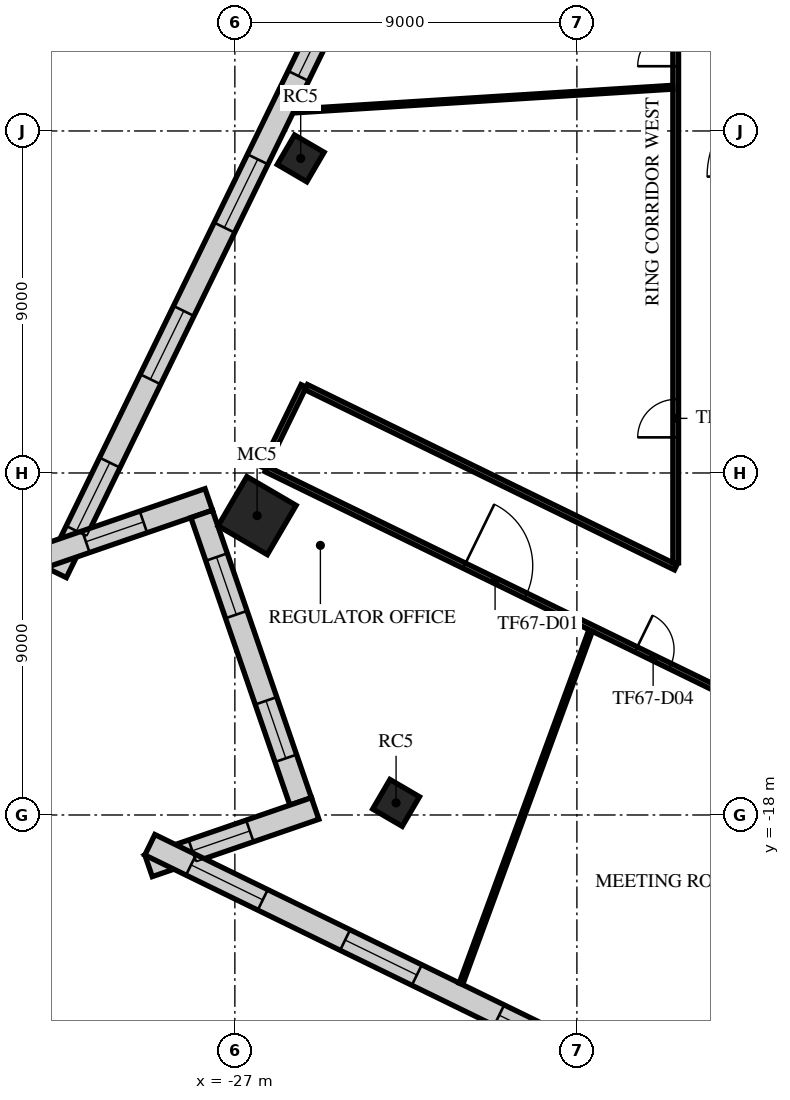
"""IFC4 building model, lengths in metres.
Left out: names, types, materials, properties, quantities, classifications, styles, units other than length and angle.
Written with IfcOpenShell. Run it as: python <this file> out.ifc"""

import sys

from ifc_helpers import new_model, si_unit, direction, frame, frame_2d, origin, origin_2d, place, context, subcontext, project, spatial, rectangle, extrude, element, fill, save


model = new_model("IFC4")
c1 = context("Model", 3, precision=1e-05, world=origin(), true_north=direction((0.0, 1.0)))
c2 = subcontext(c1, "Body", "Model", "MODEL_VIEW")
j1 = project(units=[si_unit("LENGTHUNIT", "METRE"), si_unit("PLANEANGLEUNIT", "RADIAN")], contexts=[c1])
p1 = place(None, origin())
s1 = spatial("IfcSite", under=j1, at=p1, CompositionType="ELEMENT")
p2 = place(p1, origin())
s2 = spatial("IfcBuilding", under=s1, at=p2, CompositionType="ELEMENT")
p3 = place(p2, frame((0.0, 0.0, 282.9)))
s3 = spatial("IfcBuildingStorey", under=s2, at=p3, CompositionType="ELEMENT", Elevation=282.9)
p4 = place(p3, frame((-25.268, -0.722, 0.0), z_axis=(0.0, 0.0, 1.0), x_axis=(0.504643651291, 0.863327739165, 0.0)))
e1 = element("IfcColumn", 1, at=p4, inside=s3, PredefinedType="COLUMN", context=c2, shape_type="SweptSolid", body=[
    extrude(rectangle(XDim=0.9, YDim=0.9, at=origin_2d()), origin(), (0.0, 0.0, 1.0), 4.0),
])
p5 = place(p3, frame((-26.415, -10.122, 0.0), z_axis=(0.0, 0.0, 1.0), x_axis=(0.504643651291, 0.863327739165, 0.0)))
e2 = element("IfcColumn", 2, at=p5, inside=s3, PredefinedType="COLUMN", context=c2, shape_type="SweptSolid", body=[
    extrude(rectangle(XDim=1.5, YDim=1.5, at=origin_2d()), origin(), (0.0, 0.0, 1.0), 4.0),
])
p6 = place(p3, frame((-22.758, -17.682, 0.0), z_axis=(0.0, 0.0, 1.0), x_axis=(0.504643651291, 0.863327739165, 0.0)))
e3 = element("IfcColumn", 3, at=p6, inside=s3, PredefinedType="COLUMN", context=c2, shape_type="SweptSolid", body=[
    extrude(rectangle(XDim=0.9, YDim=0.9, at=origin_2d()), origin(), (0.0, 0.0, 1.0), 4.0),
])
p7 = place(p3, frame((-10.292, 32.278, 0.0), z_axis=(0.0, 0.0, 1.0), x_axis=(-0.438370550468, -0.898794337144, 0.0)))
e4 = element("IfcWall", 4, at=p7, inside=s3, PredefinedType="STANDARD", context=c2, shape_type="SweptSolid", body=[
    extrude(rectangle(XDim=48.843, YDim=0.6, at=frame_2d((24.421, 0.0))), origin(), (0.0, 0.0, 1.0), 3.64),
])
p8 = place(p7, frame((1.22, 0.0, 0.9)))
e5 = element("IfcOpeningElement", 5, at=p8, cuts=e4, PredefinedType="OPENING", context=c2, shape_type="SweptSolid", body=[
    extrude(rectangle(XDim=2.0, YDim=2.1, at=frame_2d((1.0, 1.05))), frame((0.0, 0.31, 0.0), z_axis=(0.0, -1.0, 0.0), x_axis=(1.0, 0.0, 0.0)), (0.0, 0.0, 1.0), 0.62),
])
p9 = place(p7, frame((5.66, 0.0, 0.9)))
e6 = element("IfcOpeningElement", 6, at=p9, cuts=e4, PredefinedType="OPENING", context=c2, shape_type="SweptSolid", body=[
    extrude(rectangle(XDim=2.0, YDim=2.1, at=frame_2d((1.0, 1.05))), frame((0.0, 0.31, 0.0), z_axis=(0.0, -1.0, 0.0), x_axis=(1.0, 0.0, 0.0)), (0.0, 0.0, 1.0), 0.62),
])
p10 = place(p7, frame((10.101, 0.0, 0.9)))
e7 = element("IfcOpeningElement", 7, at=p10, cuts=e4, PredefinedType="OPENING", context=c2, shape_type="SweptSolid", body=[
    extrude(rectangle(XDim=2.0, YDim=2.1, at=frame_2d((1.0, 1.05))), frame((0.0, 0.31, 0.0), z_axis=(0.0, -1.0, 0.0), x_axis=(1.0, 0.0, 0.0)), (0.0, 0.0, 1.0), 0.62),
])
p11 = place(p7, frame((14.541, 0.0, 0.9)))
e8 = element("IfcOpeningElement", 8, at=p11, cuts=e4, PredefinedType="OPENING", context=c2, shape_type="SweptSolid", body=[
    extrude(rectangle(XDim=2.0, YDim=2.1, at=frame_2d((1.0, 1.05))), frame((0.0, 0.31, 0.0), z_axis=(0.0, -1.0, 0.0), x_axis=(1.0, 0.0, 0.0)), (0.0, 0.0, 1.0), 0.62),
])
p12 = place(p7, frame((18.981, 0.0, 0.9)))
e9 = element("IfcOpeningElement", 9, at=p12, cuts=e4, PredefinedType="OPENING", context=c2, shape_type="SweptSolid", body=[
    extrude(rectangle(XDim=2.0, YDim=2.1, at=frame_2d((1.0, 1.05))), frame((0.0, 0.31, 0.0), z_axis=(0.0, -1.0, 0.0), x_axis=(1.0, 0.0, 0.0)), (0.0, 0.0, 1.0), 0.62),
])
p13 = place(p7, frame((23.422, 0.0, 0.9)))
e10 = element("IfcOpeningElement", 10, at=p13, cuts=e4, PredefinedType="OPENING", context=c2, shape_type="SweptSolid", body=[
    extrude(rectangle(XDim=2.0, YDim=2.1, at=frame_2d((1.0, 1.05))), frame((0.0, 0.31, 0.0), z_axis=(0.0, -1.0, 0.0), x_axis=(1.0, 0.0, 0.0)), (0.0, 0.0, 1.0), 0.62),
])
p14 = place(p7, frame((27.862, 0.0, 0.9)))
e11 = element("IfcOpeningElement", 11, at=p14, cuts=e4, PredefinedType="OPENING", context=c2, shape_type="SweptSolid", body=[
    extrude(rectangle(XDim=2.0, YDim=2.1, at=frame_2d((1.0, 1.05))), frame((0.0, 0.31, 0.0), z_axis=(0.0, -1.0, 0.0), x_axis=(1.0, 0.0, 0.0)), (0.0, 0.0, 1.0), 0.62),
])
p15 = place(p7, frame((32.302, 0.0, 0.9)))
e12 = element("IfcOpeningElement", 12, at=p15, cuts=e4, PredefinedType="OPENING", context=c2, shape_type="SweptSolid", body=[
    extrude(rectangle(XDim=2.0, YDim=2.1, at=frame_2d((1.0, 1.05))), frame((0.0, 0.31, 0.0), z_axis=(0.0, -1.0, 0.0), x_axis=(1.0, 0.0, 0.0)), (0.0, 0.0, 1.0), 0.62),
])
p16 = place(p7, frame((36.742, 0.0, 0.9)))
e13 = element("IfcOpeningElement", 13, at=p16, cuts=e4, PredefinedType="OPENING", context=c2, shape_type="SweptSolid", body=[
    extrude(rectangle(XDim=2.0, YDim=2.1, at=frame_2d((1.0, 1.05))), frame((0.0, 0.31, 0.0), z_axis=(0.0, -1.0, 0.0), x_axis=(1.0, 0.0, 0.0)), (0.0, 0.0, 1.0), 0.62),
])
p17 = place(p7, frame((41.183, 0.0, 0.9)))
e14 = element("IfcOpeningElement", 14, at=p17, cuts=e4, PredefinedType="OPENING", context=c2, shape_type="SweptSolid", body=[
    extrude(rectangle(XDim=2.0, YDim=2.1, at=frame_2d((1.0, 1.05))), frame((0.0, 0.31, 0.0), z_axis=(0.0, -1.0, 0.0), x_axis=(1.0, 0.0, 0.0)), (0.0, 0.0, 1.0), 0.62),
])
p18 = place(p7, frame((45.623, 0.0, 0.9)))
e15 = element("IfcOpeningElement", 15, at=p18, cuts=e4, PredefinedType="OPENING", context=c2, shape_type="SweptSolid", body=[
    extrude(rectangle(XDim=2.0, YDim=2.1, at=frame_2d((1.0, 1.05))), frame((0.0, 0.31, 0.0), z_axis=(0.0, -1.0, 0.0), x_axis=(1.0, 0.0, 0.0)), (0.0, 0.0, 1.0), 0.62),
])
p19 = place(p3, frame((-32.07, -11.206, 0.0), z_axis=(0.0, 0.0, 1.0), x_axis=(0.945524563242, 0.325550764561, 0.0)))
e16 = element("IfcWall", 16, at=p19, inside=s3, PredefinedType="STANDARD", context=c2, shape_type="SweptSolid", body=[
    extrude(rectangle(XDim=4.635, YDim=0.6, at=frame_2d((2.318, 0.0))), origin(), (0.0, 0.0, 1.0), 3.64),
])
p20 = place(p19, frame((1.218, 0.0, 0.9)))
e17 = element("IfcOpeningElement", 17, at=p20, cuts=e16, PredefinedType="OPENING", context=c2, shape_type="SweptSolid", body=[
    extrude(rectangle(XDim=1.6, YDim=2.1, at=frame_2d((0.8, 1.05))), frame((0.0, 0.31, 0.0), z_axis=(0.0, -1.0, 0.0), x_axis=(1.0, 0.0, 0.0)), (0.0, 0.0, 1.0), 0.62),
])
p21 = place(p3, frame((-27.873, -10.079, 0.0), z_axis=(0.0, 0.0, 1.0), x_axis=(0.325569297229, -0.945518182111, 0.0)))
e18 = element("IfcWall", 18, at=p21, inside=s3, PredefinedType="STANDARD", context=c2, shape_type="SweptSolid", body=[
    extrude(rectangle(XDim=8.0, YDim=0.6, at=frame_2d((4.0, 0.0))), origin(), (0.0, 0.0, 1.0), 3.64),
])
p22 = place(p21, frame((1.2, 0.0, 0.9)))
e19 = element("IfcOpeningElement", 19, at=p22, cuts=e18, PredefinedType="OPENING", context=c2, shape_type="SweptSolid", body=[
    extrude(rectangle(XDim=1.6, YDim=2.1, at=frame_2d((0.8, 1.05))), frame((0.0, 0.31, 0.0), z_axis=(0.0, -1.0, 0.0), x_axis=(1.0, 0.0, 0.0)), (0.0, 0.0, 1.0), 0.62),
])
p23 = place(p21, frame((5.2, 0.0, 0.9)))
e20 = element("IfcOpeningElement", 20, at=p23, cuts=e18, PredefinedType="OPENING", context=c2, shape_type="SweptSolid", body=[
    extrude(rectangle(XDim=1.6, YDim=2.1, at=frame_2d((0.8, 1.05))), frame((0.0, 0.31, 0.0), z_axis=(0.0, -1.0, 0.0), x_axis=(1.0, 0.0, 0.0)), (0.0, 0.0, 1.0), 0.62),
])
p24 = place(p3, frame((-24.888, -17.829, 0.0), z_axis=(0.0, 0.0, 1.0), x_axis=(-0.945508349791, -0.325597850847, 0.0)))
e21 = element("IfcWall", 21, at=p24, inside=s3, PredefinedType="STANDARD", context=c2, shape_type="SweptSolid", body=[
    extrude(rectangle(XDim=4.635, YDim=0.6, at=frame_2d((2.318, 0.0))), origin(), (0.0, 0.0, 1.0), 3.64),
])
p25 = place(p24, frame((1.818, 0.0, 0.9)))
e22 = element("IfcOpeningElement", 22, at=p25, cuts=e21, PredefinedType="OPENING", context=c2, shape_type="SweptSolid", body=[
    extrude(rectangle(XDim=1.6, YDim=2.1, at=frame_2d((0.8, 1.05))), frame((0.0, 0.31, 0.0), z_axis=(0.0, -1.0, 0.0), x_axis=(1.0, 0.0, 0.0)), (0.0, 0.0, 1.0), 0.62),
])
p26 = place(p3, frame((-29.237, -18.785, 0.0), z_axis=(0.0, 0.0, 1.0), x_axis=(0.898796077823, -0.438366981524, 0.0)))
e23 = element("IfcWall", 23, at=p26, inside=s3, PredefinedType="STANDARD", context=c2, shape_type="SweptSolid", body=[
    extrude(rectangle(XDim=36.086, YDim=0.6, at=frame_2d((18.043, 0.0))), origin(), (0.0, 0.0, 1.0), 3.64),
])
p27 = place(p26, frame((1.205, 0.0, 0.9)))
e24 = element("IfcOpeningElement", 24, at=p27, cuts=e23, PredefinedType="OPENING", context=c2, shape_type="SweptSolid", body=[
    extrude(rectangle(XDim=2.1, YDim=2.1, at=frame_2d((1.05, 1.05))), frame((0.0, 0.31, 0.0), z_axis=(0.0, -1.0, 0.0), x_axis=(1.0, 0.0, 0.0)), (0.0, 0.0, 1.0), 0.62),
])
p28 = place(p26, frame((5.716, 0.0, 0.9)))
e25 = element("IfcOpeningElement", 25, at=p28, cuts=e23, PredefinedType="OPENING", context=c2, shape_type="SweptSolid", body=[
    extrude(rectangle(XDim=2.1, YDim=2.1, at=frame_2d((1.05, 1.05))), frame((0.0, 0.31, 0.0), z_axis=(0.0, -1.0, 0.0), x_axis=(1.0, 0.0, 0.0)), (0.0, 0.0, 1.0), 0.62),
])
p29 = place(p26, frame((10.227, 0.0, 0.9)))
e26 = element("IfcOpeningElement", 26, at=p29, cuts=e23, PredefinedType="OPENING", context=c2, shape_type="SweptSolid", body=[
    extrude(rectangle(XDim=2.1, YDim=2.1, at=frame_2d((1.05, 1.05))), frame((0.0, 0.31, 0.0), z_axis=(0.0, -1.0, 0.0), x_axis=(1.0, 0.0, 0.0)), (0.0, 0.0, 1.0), 0.62),
])
p30 = place(p26, frame((14.738, 0.0, 0.9)))
e27 = element("IfcOpeningElement", 27, at=p30, cuts=e23, PredefinedType="OPENING", context=c2, shape_type="SweptSolid", body=[
    extrude(rectangle(XDim=2.1, YDim=2.1, at=frame_2d((1.05, 1.05))), frame((0.0, 0.31, 0.0), z_axis=(0.0, -1.0, 0.0), x_axis=(1.0, 0.0, 0.0)), (0.0, 0.0, 1.0), 0.62),
])
p31 = place(p26, frame((19.249, 0.0, 0.9)))
e28 = element("IfcOpeningElement", 28, at=p31, cuts=e23, PredefinedType="OPENING", context=c2, shape_type="SweptSolid", body=[
    extrude(rectangle(XDim=2.1, YDim=2.1, at=frame_2d((1.05, 1.05))), frame((0.0, 0.31, 0.0), z_axis=(0.0, -1.0, 0.0), x_axis=(1.0, 0.0, 0.0)), (0.0, 0.0, 1.0), 0.62),
])
p32 = place(p26, frame((23.759, 0.0, 0.9)))
e29 = element("IfcOpeningElement", 29, at=p32, cuts=e23, PredefinedType="OPENING", context=c2, shape_type="SweptSolid", body=[
    extrude(rectangle(XDim=2.1, YDim=2.1, at=frame_2d((1.05, 1.05))), frame((0.0, 0.31, 0.0), z_axis=(0.0, -1.0, 0.0), x_axis=(1.0, 0.0, 0.0)), (0.0, 0.0, 1.0), 0.62),
])
p33 = place(p26, frame((28.27, 0.0, 0.9)))
e30 = element("IfcOpeningElement", 30, at=p33, cuts=e23, PredefinedType="OPENING", context=c2, shape_type="SweptSolid", body=[
    extrude(rectangle(XDim=2.1, YDim=2.1, at=frame_2d((1.05, 1.05))), frame((0.0, 0.31, 0.0), z_axis=(0.0, -1.0, 0.0), x_axis=(1.0, 0.0, 0.0)), (0.0, 0.0, 1.0), 0.62),
])
p34 = place(p26, frame((32.781, 0.0, 0.9)))
e31 = element("IfcOpeningElement", 31, at=p34, cuts=e23, PredefinedType="OPENING", context=c2, shape_type="SweptSolid", body=[
    extrude(rectangle(XDim=2.1, YDim=2.1, at=frame_2d((1.05, 1.05))), frame((0.0, 0.31, 0.0), z_axis=(0.0, -1.0, 0.0), x_axis=(1.0, 0.0, 0.0)), (0.0, 0.0, 1.0), 0.62),
])
p35 = place(p3, frame((-26.242, -8.865, 0.0), z_axis=(0.0, 0.0, 1.0), x_axis=(0.438361496965, 0.898798752769, 0.0)))
e32 = element("IfcWall", 32, at=p35, inside=s3, PredefinedType="PARTITIONING", context=c2, shape_type="SweptSolid", body=[
    extrude(rectangle(XDim=2.4, YDim=0.15, at=frame_2d((1.2, 0.0))), origin(), (0.0, 0.0, 1.0), 3.04),
])
p36 = place(p3, frame((-26.175, -8.898, 0.0), z_axis=(0.0, 0.0, 1.0), x_axis=(0.898795233888, -0.438368711864, 0.0)))
e33 = element("IfcWall", 33, at=p36, inside=s3, PredefinedType="PARTITIONING", context=c2, shape_type="SweptSolid", body=[
    extrude(rectangle(XDim=39.325, YDim=0.15, at=frame_2d((19.663, 0.0))), origin(), (0.0, 0.0, 1.0), 3.04),
])
p37 = place(p36, frame((5.8, 0.0, 0.0)))
e34 = element("IfcOpeningElement", 34, at=p37, cuts=e33, PredefinedType="OPENING", context=c2, shape_type="SweptSolid", body=[
    extrude(rectangle(XDim=1.8, YDim=2.1, at=frame_2d((0.9, 1.05))), frame((0.0, 0.085, 0.0), z_axis=(0.0, -1.0, 0.0), x_axis=(1.0, 0.0, 0.0)), (0.0, 0.0, 1.0), 0.17),
])
p38 = place(p36, frame((10.827, 0.0, 0.0)))
e35 = element("IfcOpeningElement", 35, at=p38, cuts=e33, PredefinedType="OPENING", context=c2, shape_type="SweptSolid", body=[
    extrude(rectangle(XDim=1.0, YDim=2.1, at=frame_2d((0.5, 1.05))), frame((0.0, 0.085, 0.0), z_axis=(0.0, -1.0, 0.0), x_axis=(1.0, 0.0, 0.0)), (0.0, 0.0, 1.0), 0.17),
])
p39 = place(p36, frame((23.556, 0.0, 0.0)))
e36 = element("IfcOpeningElement", 36, at=p39, cuts=e33, PredefinedType="OPENING", context=c2, shape_type="SweptSolid", body=[
    extrude(rectangle(XDim=1.0, YDim=2.1, at=frame_2d((0.5, 1.05))), frame((0.0, 0.085, 0.0), z_axis=(0.0, -1.0, 0.0), x_axis=(1.0, 0.0, 0.0)), (0.0, 0.0, 1.0), 0.17),
])
p40 = place(p3, frame((-25.123, -6.741, 0.0), z_axis=(0.0, 0.0, 1.0), x_axis=(0.898798159951, -0.438362712453, 0.0)))
e37 = element("IfcWall", 37, at=p40, inside=s3, PredefinedType="PARTITIONING", context=c2, shape_type="SweptSolid", body=[
    extrude(rectangle(XDim=10.817, YDim=0.15, at=frame_2d((5.409, 0.0))), origin(), (0.0, 0.0, 1.0), 3.24),
])
p41 = place(p3, frame((-15.4, -11.363, 0.0), z_axis=(0.0, 0.0, 1.0), x_axis=(0.0, 1.0, 0.0)))
e38 = element("IfcWall", 38, at=p41, inside=s3, PredefinedType="PARTITIONING", context=c2, shape_type="SweptSolid", body=[
    extrude(rectangle(XDim=26.763, YDim=0.15, at=frame_2d((13.381, 0.0))), origin(), (0.0, 0.0, 1.0), 3.24),
])
p42 = place(p41, frame((3.3, 0.0, 0.0)))
e39 = element("IfcOpeningElement", 39, at=p42, cuts=e38, PredefinedType="OPENING", context=c2, shape_type="SweptSolid", body=[
    extrude(rectangle(XDim=1.0, YDim=2.1, at=frame_2d((0.5, 1.05))), frame((0.0, 0.085, 0.0), z_axis=(0.0, -1.0, 0.0), x_axis=(1.0, 0.0, 0.0)), (0.0, 0.0, 1.0), 0.17),
])
p43 = place(p41, frame((13.067, 0.0, 0.0)))
e40 = element("IfcOpeningElement", 40, at=p43, cuts=e38, PredefinedType="OPENING", context=c2, shape_type="SweptSolid", body=[
    extrude(rectangle(XDim=1.0, YDim=2.1, at=frame_2d((0.5, 1.05))), frame((0.0, 0.085, 0.0), z_axis=(0.0, -1.0, 0.0), x_axis=(1.0, 0.0, 0.0)), (0.0, 0.0, 1.0), 0.17),
])
p44 = place(p3, frame((-25.443, 0.525, 0.0), z_axis=(0.0, 0.0, 1.0), x_axis=(0.998034171975, 0.062672095621, 0.0)))
e41 = element("IfcWall", 41, at=p44, inside=s3, PredefinedType="PARTITIONING", context=c2, shape_type="SweptSolid", body=[
    extrude(rectangle(XDim=9.984, YDim=0.1, at=frame_2d((4.992, 0.0))), origin(), (0.0, 0.0, 1.0), 3.04),
])
p45 = place(p3, frame((-21.051, -22.441, 0.0), z_axis=(0.0, 0.0, 1.0), x_axis=(0.344611208879, 0.938745500503, 0.0)))
e42 = element("IfcWall", 42, at=p45, inside=s3, PredefinedType="PARTITIONING", context=c2, shape_type="SweptSolid", body=[
    extrude(rectangle(XDim=9.898, YDim=0.1, at=frame_2d((4.949, 0.0))), origin(), (0.0, 0.0, 1.0), 3.04),
])
p46 = place(p15, origin())
e43 = element("IfcWindow", 43, at=p46, inside=s3, PartitioningType="SINGLE_PANEL", PredefinedType="WINDOW", context=c2, shape_type="SweptSolid", body=[
    extrude(rectangle(XDim=2.0, YDim=2.1, at=frame_2d((1.0, 1.05))), frame((0.0, 0.03, 0.0), z_axis=(0.0, -1.0, 0.0), x_axis=(1.0, 0.0, 0.0)), (0.0, 0.0, 1.0), 0.06),
])
fill(e12, e43)
p47 = place(p16, origin())
e44 = element("IfcWindow", 44, at=p47, inside=s3, PartitioningType="SINGLE_PANEL", PredefinedType="WINDOW", context=c2, shape_type="SweptSolid", body=[
    extrude(rectangle(XDim=2.0, YDim=2.1, at=frame_2d((1.0, 1.05))), frame((0.0, 0.03, 0.0), z_axis=(0.0, -1.0, 0.0), x_axis=(1.0, 0.0, 0.0)), (0.0, 0.0, 1.0), 0.06),
])
fill(e13, e44)
p48 = place(p17, origin())
e45 = element("IfcWindow", 45, at=p48, inside=s3, PartitioningType="SINGLE_PANEL", PredefinedType="WINDOW", context=c2, shape_type="SweptSolid", body=[
    extrude(rectangle(XDim=2.0, YDim=2.1, at=frame_2d((1.0, 1.05))), frame((0.0, 0.03, 0.0), z_axis=(0.0, -1.0, 0.0), x_axis=(1.0, 0.0, 0.0)), (0.0, 0.0, 1.0), 0.06),
])
fill(e14, e45)
p49 = place(p18, origin())
e46 = element("IfcWindow", 46, at=p49, inside=s3, PartitioningType="SINGLE_PANEL", PredefinedType="WINDOW", context=c2, shape_type="SweptSolid", body=[
    extrude(rectangle(XDim=2.0, YDim=2.1, at=frame_2d((1.0, 1.05))), frame((0.0, 0.03, 0.0), z_axis=(0.0, -1.0, 0.0), x_axis=(1.0, 0.0, 0.0)), (0.0, 0.0, 1.0), 0.06),
])
fill(e15, e46)
p50 = place(p20, origin())
e47 = element("IfcWindow", 47, at=p50, inside=s3, PartitioningType="SINGLE_PANEL", PredefinedType="WINDOW", context=c2, shape_type="SweptSolid", body=[
    extrude(rectangle(XDim=1.6, YDim=2.1, at=frame_2d((0.8, 1.05))), frame((0.0, 0.03, 0.0), z_axis=(0.0, -1.0, 0.0), x_axis=(1.0, 0.0, 0.0)), (0.0, 0.0, 1.0), 0.06),
])
fill(e17, e47)
p51 = place(p22, origin())
e48 = element("IfcWindow", 48, at=p51, inside=s3, PartitioningType="SINGLE_PANEL", PredefinedType="WINDOW", context=c2, shape_type="SweptSolid", body=[
    extrude(rectangle(XDim=1.6, YDim=2.1, at=frame_2d((0.8, 1.05))), frame((0.0, 0.03, 0.0), z_axis=(0.0, -1.0, 0.0), x_axis=(1.0, 0.0, 0.0)), (0.0, 0.0, 1.0), 0.06),
])
fill(e19, e48)
p52 = place(p23, origin())
e49 = element("IfcWindow", 49, at=p52, inside=s3, PartitioningType="SINGLE_PANEL", PredefinedType="WINDOW", context=c2, shape_type="SweptSolid", body=[
    extrude(rectangle(XDim=1.6, YDim=2.1, at=frame_2d((0.8, 1.05))), frame((0.0, 0.03, 0.0), z_axis=(0.0, -1.0, 0.0), x_axis=(1.0, 0.0, 0.0)), (0.0, 0.0, 1.0), 0.06),
])
fill(e20, e49)
p53 = place(p25, origin())
e50 = element("IfcWindow", 50, at=p53, inside=s3, PartitioningType="SINGLE_PANEL", PredefinedType="WINDOW", context=c2, shape_type="SweptSolid", body=[
    extrude(rectangle(XDim=1.6, YDim=2.1, at=frame_2d((0.8, 1.05))), frame((0.0, 0.03, 0.0), z_axis=(0.0, -1.0, 0.0), x_axis=(1.0, 0.0, 0.0)), (0.0, 0.0, 1.0), 0.06),
])
fill(e22, e50)
p54 = place(p27, origin())
e51 = element("IfcWindow", 51, at=p54, inside=s3, PartitioningType="SINGLE_PANEL", PredefinedType="WINDOW", context=c2, shape_type="SweptSolid", body=[
    extrude(rectangle(XDim=2.1, YDim=2.1, at=frame_2d((1.05, 1.05))), frame((0.0, 0.03, 0.0), z_axis=(0.0, -1.0, 0.0), x_axis=(1.0, 0.0, 0.0)), (0.0, 0.0, 1.0), 0.06),
])
fill(e24, e51)
p55 = place(p28, origin())
e52 = element("IfcWindow", 52, at=p55, inside=s3, PartitioningType="SINGLE_PANEL", PredefinedType="WINDOW", context=c2, shape_type="SweptSolid", body=[
    extrude(rectangle(XDim=2.1, YDim=2.1, at=frame_2d((1.05, 1.05))), frame((0.0, 0.03, 0.0), z_axis=(0.0, -1.0, 0.0), x_axis=(1.0, 0.0, 0.0)), (0.0, 0.0, 1.0), 0.06),
])
fill(e25, e52)
p56 = place(p29, origin())
e53 = element("IfcWindow", 53, at=p56, inside=s3, PartitioningType="SINGLE_PANEL", PredefinedType="WINDOW", context=c2, shape_type="SweptSolid", body=[
    extrude(rectangle(XDim=2.1, YDim=2.1, at=frame_2d((1.05, 1.05))), frame((0.0, 0.03, 0.0), z_axis=(0.0, -1.0, 0.0), x_axis=(1.0, 0.0, 0.0)), (0.0, 0.0, 1.0), 0.06),
])
fill(e26, e53)
p57 = place(p37, frame((1.8, 0.0, 0.0), z_axis=(0.0, 0.0, 1.0), x_axis=(-1.0, 0.0, 0.0)))
e54 = element("IfcDoor", 54, at=p57, inside=s3, OperationType="DOUBLE_DOOR_SINGLE_SWING", PredefinedType="DOOR", context=c2, shape_type="SweptSolid", body=[
    extrude(rectangle(XDim=1.8, YDim=2.1, at=frame_2d((0.9, 1.05))), frame((0.0, 0.025, 0.0), z_axis=(0.0, -1.0, 0.0), x_axis=(1.0, 0.0, 0.0)), (0.0, 0.0, 1.0), 0.05),
])
fill(e34, e54)
p58 = place(p42, origin())
e55 = element("IfcDoor", 55, at=p58, inside=s3, OperationType="SINGLE_SWING_LEFT", PredefinedType="DOOR", context=c2, shape_type="SweptSolid", body=[
    extrude(rectangle(XDim=1.0, YDim=2.1, at=frame_2d((0.5, 1.05))), frame((0.0, 0.025, 0.0), z_axis=(0.0, -1.0, 0.0), x_axis=(1.0, 0.0, 0.0)), (0.0, 0.0, 1.0), 0.05),
])
fill(e39, e55)
p59 = place(p43, origin())
e56 = element("IfcDoor", 56, at=p59, inside=s3, OperationType="SINGLE_SWING_LEFT", PredefinedType="DOOR", context=c2, shape_type="SweptSolid", body=[
    extrude(rectangle(XDim=1.0, YDim=2.1, at=frame_2d((0.5, 1.05))), frame((0.0, 0.025, 0.0), z_axis=(0.0, -1.0, 0.0), x_axis=(1.0, 0.0, 0.0)), (0.0, 0.0, 1.0), 0.05),
])
fill(e40, e56)
p60 = place(p38, frame((1.0, 0.0, 0.0), z_axis=(0.0, 0.0, 1.0), x_axis=(-1.0, 0.0, 0.0)))
e57 = element("IfcDoor", 57, at=p60, inside=s3, OperationType="SINGLE_SWING_RIGHT", PredefinedType="DOOR", context=c2, shape_type="SweptSolid", body=[
    extrude(rectangle(XDim=1.0, YDim=2.1, at=frame_2d((0.5, 1.05))), frame((0.0, 0.025, 0.0), z_axis=(0.0, -1.0, 0.0), x_axis=(1.0, 0.0, 0.0)), (0.0, 0.0, 1.0), 0.05),
])
fill(e35, e57)
save(model, sys.argv[1])
